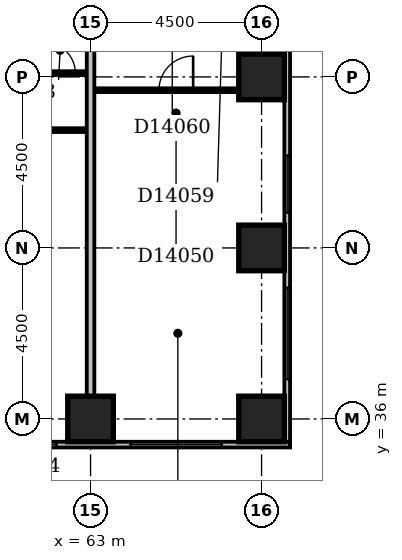
"""IFC4 building model, lengths in metres.
Left out: names, types, materials, properties, quantities, classifications, styles, units other than length and angle.
Written with IfcOpenShell. Run it as: python <this file> out.ifc"""

import sys

from ifc_helpers import new_model, si_unit, direction, frame, frame_2d, origin, origin_2d, place, context, subcontext, project, spatial, rectangle, extrude, element, fill, save


model = new_model("IFC4")
c1 = context("Model", 3, precision=1e-05, world=origin(), true_north=direction((0.0, 1.0)))
c2 = subcontext(c1, "Body", "Model", "MODEL_VIEW")
j1 = project(units=[si_unit("LENGTHUNIT", "METRE"), si_unit("PLANEANGLEUNIT", "RADIAN")], contexts=[c1])
p1 = place(None, origin())
s1 = spatial("IfcSite", under=j1, at=p1, CompositionType="ELEMENT")
p2 = place(p1, origin())
s2 = spatial("IfcBuilding", under=s1, at=p2, CompositionType="ELEMENT")
p3 = place(p2, frame((0.0, 0.0, 61.4)))
s3 = spatial("IfcBuildingStorey", under=s2, at=p3, CompositionType="ELEMENT", Elevation=61.4)
for number, where, z_axis, x_axis in (
    (1, (63.0, 36.0, -0.3), (0.0, 0.0, 1.0), (1.0, 0.0, 0.0)),
    (2, (67.5, 36.0, -0.3), (0.0, 0.0, 1.0), (1.0, 0.0, 0.0)),
    (3, (67.5, 40.5, -0.3), (0.0, 0.0, 1.0), (1.0, 0.0, 0.0)),
    (4, (67.5, 45.0, -0.3), (0.0, 0.0, 1.0), (1.0, 0.0, 0.0)),
):
    element("IfcColumn", number, at=place(p3, frame(where, z_axis=z_axis, x_axis=x_axis)), inside=s3, PredefinedType="COLUMN", context=c2, shape_type="SweptSolid", body=[
        extrude(rectangle(XDim=1.2, YDim=1.2, at=origin_2d()), origin(), (0.0, 0.0, 1.0), 3.6),
    ])
p4 = place(p3, frame((23.1, 35.325, 0.0), z_axis=(0.0, 0.0, 1.0), x_axis=(1.0, 0.0, 0.0)))
e5 = element("IfcWall", 5, at=p4, inside=s3, PredefinedType="STANDARD", context=c2, shape_type="SweptSolid", body=[
    extrude(rectangle(XDim=45.15, YDim=0.15, at=frame_2d((22.575, 0.0))), origin(), (0.0, 0.0, 1.0), 2.7),
])
p5 = place(p4, frame((0.45, 0.0, 0.6)))
e6 = element("IfcOpeningElement", 6, at=p5, cuts=e5, PredefinedType="OPENING", context=c2, shape_type="SweptSolid", body=[
    extrude(rectangle(XDim=2.4, YDim=1.8, at=frame_2d((1.2, 0.9))), frame((0.0, 0.087, 0.0), z_axis=(0.0, -1.0, 0.0), x_axis=(1.0, 0.0, 0.0)), (0.0, 0.0, 1.0), 0.174),
])
p6 = place(p4, frame((4.77, 0.0, 0.6)))
e7 = element("IfcOpeningElement", 7, at=p6, cuts=e5, PredefinedType="OPENING", context=c2, shape_type="SweptSolid", body=[
    extrude(rectangle(XDim=2.1, YDim=1.8, at=frame_2d((1.05, 0.9))), frame((0.0, 0.087, 0.0), z_axis=(0.0, -1.0, 0.0), x_axis=(1.0, 0.0, 0.0)), (0.0, 0.0, 1.0), 0.174),
])
p7 = place(p4, frame((9.45, 0.0, 0.6)))
e8 = element("IfcOpeningElement", 8, at=p7, cuts=e5, PredefinedType="OPENING", context=c2, shape_type="SweptSolid", body=[
    extrude(rectangle(XDim=2.4, YDim=1.8, at=frame_2d((1.2, 0.9))), frame((0.0, 0.087, 0.0), z_axis=(0.0, -1.0, 0.0), x_axis=(1.0, 0.0, 0.0)), (0.0, 0.0, 1.0), 0.174),
])
p8 = place(p4, frame((13.95, 0.0, 0.6)))
e9 = element("IfcOpeningElement", 9, at=p8, cuts=e5, PredefinedType="OPENING", context=c2, shape_type="SweptSolid", body=[
    extrude(rectangle(XDim=2.4, YDim=1.8, at=frame_2d((1.2, 0.9))), frame((0.0, 0.087, 0.0), z_axis=(0.0, -1.0, 0.0), x_axis=(1.0, 0.0, 0.0)), (0.0, 0.0, 1.0), 0.174),
])
p9 = place(p4, frame((19.47, 0.0, 0.6)))
e10 = element("IfcOpeningElement", 10, at=p9, cuts=e5, PredefinedType="OPENING", context=c2, shape_type="SweptSolid", body=[
    extrude(rectangle(XDim=1.5, YDim=1.8, at=frame_2d((0.75, 0.9))), frame((0.0, 0.087, 0.0), z_axis=(0.0, -1.0, 0.0), x_axis=(1.0, 0.0, 0.0)), (0.0, 0.0, 1.0), 0.174),
])
p10 = place(p4, frame((22.95, 0.0, 0.6)))
e11 = element("IfcOpeningElement", 11, at=p10, cuts=e5, PredefinedType="OPENING", context=c2, shape_type="SweptSolid", body=[
    extrude(rectangle(XDim=2.4, YDim=1.8, at=frame_2d((1.2, 0.9))), frame((0.0, 0.087, 0.0), z_axis=(0.0, -1.0, 0.0), x_axis=(1.0, 0.0, 0.0)), (0.0, 0.0, 1.0), 0.174),
])
p11 = place(p4, frame((27.45, 0.0, 0.6)))
e12 = element("IfcOpeningElement", 12, at=p11, cuts=e5, PredefinedType="OPENING", context=c2, shape_type="SweptSolid", body=[
    extrude(rectangle(XDim=2.4, YDim=1.8, at=frame_2d((1.2, 0.9))), frame((0.0, 0.087, 0.0), z_axis=(0.0, -1.0, 0.0), x_axis=(1.0, 0.0, 0.0)), (0.0, 0.0, 1.0), 0.174),
])
p12 = place(p4, frame((31.95, 0.0, 0.6)))
e13 = element("IfcOpeningElement", 13, at=p12, cuts=e5, PredefinedType="OPENING", context=c2, shape_type="SweptSolid", body=[
    extrude(rectangle(XDim=2.4, YDim=1.8, at=frame_2d((1.2, 0.9))), frame((0.0, 0.087, 0.0), z_axis=(0.0, -1.0, 0.0), x_axis=(1.0, 0.0, 0.0)), (0.0, 0.0, 1.0), 0.174),
])
p13 = place(p4, frame((38.403, 0.0, 0.6)))
e14 = element("IfcOpeningElement", 14, at=p13, cuts=e5, PredefinedType="OPENING", context=c2, shape_type="SweptSolid", body=[
    extrude(rectangle(XDim=0.6, YDim=1.8, at=frame_2d((0.3, 0.9))), frame((0.0, 0.087, 0.0), z_axis=(0.0, -1.0, 0.0), x_axis=(1.0, 0.0, 0.0)), (0.0, 0.0, 1.0), 0.174),
])
p14 = place(p4, frame((40.95, 0.0, 0.6)))
e15 = element("IfcOpeningElement", 15, at=p14, cuts=e5, PredefinedType="OPENING", context=c2, shape_type="SweptSolid", body=[
    extrude(rectangle(XDim=2.4, YDim=1.8, at=frame_2d((1.2, 0.9))), frame((0.0, 0.087, 0.0), z_axis=(0.0, -1.0, 0.0), x_axis=(1.0, 0.0, 0.0)), (0.0, 0.0, 1.0), 0.174),
])
p15 = place(p3, frame((68.175, 35.4, 0.0), z_axis=(0.0, 0.0, 1.0), x_axis=(0.0, 1.0, 0.0)))
e16 = element("IfcWall", 16, at=p15, inside=s3, PredefinedType="STANDARD", context=c2, shape_type="SweptSolid", body=[
    extrude(rectangle(XDim=23.85, YDim=0.15, at=frame_2d((11.925, 0.0))), origin(), (0.0, 0.0, 1.0), 2.7),
])
p16 = place(p15, frame((1.65, 0.0, 0.6)))
e17 = element("IfcOpeningElement", 17, at=p16, cuts=e16, PredefinedType="OPENING", context=c2, shape_type="SweptSolid", body=[
    extrude(rectangle(XDim=2.4, YDim=1.8, at=frame_2d((1.2, 0.9))), frame((0.0, 0.087, 0.0), z_axis=(0.0, -1.0, 0.0), x_axis=(1.0, 0.0, 0.0)), (0.0, 0.0, 1.0), 0.174),
])
p17 = place(p15, frame((6.03, 0.0, 0.6)))
e18 = element("IfcOpeningElement", 18, at=p17, cuts=e16, PredefinedType="OPENING", context=c2, shape_type="SweptSolid", body=[
    extrude(rectangle(XDim=1.5, YDim=1.8, at=frame_2d((0.75, 0.9))), frame((0.0, 0.087, 0.0), z_axis=(0.0, -1.0, 0.0), x_axis=(1.0, 0.0, 0.0)), (0.0, 0.0, 1.0), 0.174),
])
p18 = place(p3, frame((63.0, 36.6, 0.0), z_axis=(0.0, 0.0, 1.0), x_axis=(0.0, 1.0, 0.0)))
e19 = element("IfcWall", 19, at=p18, inside=s3, PredefinedType="PARTITIONING", context=c2, shape_type="SweptSolid", body=[
    extrude(rectangle(XDim=12.8, YDim=0.2, at=frame_2d((6.4, 0.0))), origin(), (0.0, 0.0, 1.0), 2.4),
])
p19 = place(p3, frame((54.1, 43.6, 0.0), z_axis=(0.0, 0.0, 1.0), x_axis=(1.0, 0.0, 0.0)))
e20 = element("IfcWall", 20, at=p19, inside=s3, PredefinedType="PARTITIONING", context=c2, shape_type="SweptSolid", body=[
    extrude(rectangle(XDim=8.8, YDim=0.1, at=frame_2d((4.4, 0.0))), origin(), (0.0, 0.0, 1.0), 3.3),
])
p20 = place(p19, frame((1.7, 0.0, 0.0)))
e21 = element("IfcOpeningElement", 21, at=p20, cuts=e20, PredefinedType="OPENING", context=c2, shape_type="SweptSolid", body=[
    extrude(rectangle(XDim=0.9, YDim=2.1, at=frame_2d((0.45, 1.05))), frame((0.0, 0.062, 0.0), z_axis=(0.0, -1.0, 0.0), x_axis=(1.0, 0.0, 0.0)), (0.0, 0.0, 1.0), 0.124),
])
p21 = place(p19, frame((6.2, 0.0, 0.0)))
e22 = element("IfcOpeningElement", 22, at=p21, cuts=e20, PredefinedType="OPENING", context=c2, shape_type="SweptSolid", body=[
    extrude(rectangle(XDim=0.9, YDim=2.1, at=frame_2d((0.45, 1.05))), frame((0.0, 0.062, 0.0), z_axis=(0.0, -1.0, 0.0), x_axis=(1.0, 0.0, 0.0)), (0.0, 0.0, 1.0), 0.124),
])
p22 = place(p3, frame((63.1, 44.65, 0.0), z_axis=(0.0, 0.0, 1.0), x_axis=(1.0, 0.0, 0.0)))
e23 = element("IfcWall", 23, at=p22, inside=s3, PredefinedType="PARTITIONING", context=c2, shape_type="SweptSolid", body=[
    extrude(rectangle(XDim=3.8, YDim=0.1, at=frame_2d((1.9, 0.0))), origin(), (0.0, 0.0, 1.0), 3.3),
])
p23 = place(p22, frame((1.7, 0.0, 0.0)))
e24 = element("IfcOpeningElement", 24, at=p23, cuts=e23, PredefinedType="OPENING", context=c2, shape_type="SweptSolid", body=[
    extrude(rectangle(XDim=0.9, YDim=2.1, at=frame_2d((0.45, 1.05))), frame((0.0, 0.062, 0.0), z_axis=(0.0, -1.0, 0.0), x_axis=(1.0, 0.0, 0.0)), (0.0, 0.0, 1.0), 0.124),
])
p24 = place(p3, frame((55.65, 45.1, 0.0), z_axis=(0.0, 0.0, 1.0), x_axis=(1.0, 0.0, 0.0)))
e25 = element("IfcWall", 25, at=p24, inside=s3, PredefinedType="PARTITIONING", context=c2, shape_type="SweptSolid", body=[
    extrude(rectangle(XDim=7.25, YDim=0.1, at=frame_2d((3.625, 0.0))), origin(), (0.0, 0.0, 1.0), 3.3),
])
p25 = place(p24, frame((4.15, 0.0, 0.0)))
e26 = element("IfcOpeningElement", 26, at=p25, cuts=e25, PredefinedType="OPENING", context=c2, shape_type="SweptSolid", body=[
    extrude(rectangle(XDim=0.8, YDim=2.1, at=frame_2d((0.4, 1.05))), frame((0.0, 0.062, 0.0), z_axis=(0.0, -1.0, 0.0), x_axis=(1.0, 0.0, 0.0)), (0.0, 0.0, 1.0), 0.124),
])
p26 = place(p24, frame((1.2, 0.0, 0.0)))
e27 = element("IfcOpeningElement", 27, at=p26, cuts=e25, PredefinedType="OPENING", context=c2, shape_type="SweptSolid", body=[
    extrude(rectangle(XDim=0.9, YDim=2.1, at=frame_2d((0.45, 1.05))), frame((0.0, 0.062, 0.0), z_axis=(0.0, -1.0, 0.0), x_axis=(1.0, 0.0, 0.0)), (0.0, 0.0, 1.0), 0.124),
])
p27 = place(p24, frame((6.15, 0.0, 0.0)))
e28 = element("IfcOpeningElement", 28, at=p27, cuts=e25, PredefinedType="OPENING", context=c2, shape_type="SweptSolid", body=[
    extrude(rectangle(XDim=0.8, YDim=2.1, at=frame_2d((0.4, 1.05))), frame((0.0, 0.062, 0.0), z_axis=(0.0, -1.0, 0.0), x_axis=(1.0, 0.0, 0.0)), (0.0, 0.0, 1.0), 0.124),
])
p28 = place(p13, origin())
e29 = element("IfcWindow", 29, at=p28, inside=s3, PartitioningType="SINGLE_PANEL", PredefinedType="WINDOW", context=c2, shape_type="SweptSolid", body=[
    extrude(rectangle(XDim=0.6, YDim=1.8, at=frame_2d((0.3, 0.9))), frame((0.0, 0.03, 0.0), z_axis=(0.0, -1.0, 0.0), x_axis=(1.0, 0.0, 0.0)), (0.0, 0.0, 1.0), 0.06),
])
fill(e14, e29)
p29 = place(p14, origin())
e30 = element("IfcWindow", 30, at=p29, inside=s3, PartitioningType="SINGLE_PANEL", PredefinedType="WINDOW", context=c2, shape_type="SweptSolid", body=[
    extrude(rectangle(XDim=2.4, YDim=1.8, at=frame_2d((1.2, 0.9))), frame((0.0, 0.03, 0.0), z_axis=(0.0, -1.0, 0.0), x_axis=(1.0, 0.0, 0.0)), (0.0, 0.0, 1.0), 0.06),
])
fill(e15, e30)
p30 = place(p16, origin())
e31 = element("IfcWindow", 31, at=p30, inside=s3, PartitioningType="SINGLE_PANEL", PredefinedType="WINDOW", context=c2, shape_type="SweptSolid", body=[
    extrude(rectangle(XDim=2.4, YDim=1.8, at=frame_2d((1.2, 0.9))), frame((0.0, 0.03, 0.0), z_axis=(0.0, -1.0, 0.0), x_axis=(1.0, 0.0, 0.0)), (0.0, 0.0, 1.0), 0.06),
])
fill(e17, e31)
p31 = place(p17, origin())
e32 = element("IfcWindow", 32, at=p31, inside=s3, PartitioningType="SINGLE_PANEL", PredefinedType="WINDOW", context=c2, shape_type="SweptSolid", body=[
    extrude(rectangle(XDim=1.5, YDim=1.8, at=frame_2d((0.75, 0.9))), frame((0.0, 0.03, 0.0), z_axis=(0.0, -1.0, 0.0), x_axis=(1.0, 0.0, 0.0)), (0.0, 0.0, 1.0), 0.06),
])
fill(e18, e32)
p32 = place(p23, frame((0.9, 0.0, 0.0), z_axis=(0.0, 0.0, 1.0), x_axis=(-1.0, 0.0, 0.0)))
e33 = element("IfcDoor", 33, at=p32, inside=s3, OperationType="SINGLE_SWING_LEFT", PredefinedType="DOOR", context=c2, shape_type="SweptSolid", body=[
    extrude(rectangle(XDim=0.9, YDim=2.1, at=frame_2d((0.45, 1.05))), frame((0.0, 0.025, 0.0), z_axis=(0.0, -1.0, 0.0), x_axis=(1.0, 0.0, 0.0)), (0.0, 0.0, 1.0), 0.05),
])
fill(e24, e33)
p33 = place(p27, origin())
e34 = element("IfcDoor", 34, at=p33, inside=s3, OperationType="SINGLE_SWING_LEFT", PredefinedType="DOOR", context=c2, shape_type="SweptSolid", body=[
    extrude(rectangle(XDim=0.8, YDim=2.1, at=frame_2d((0.4, 1.05))), frame((0.0, 0.025, 0.0), z_axis=(0.0, -1.0, 0.0), x_axis=(1.0, 0.0, 0.0)), (0.0, 0.0, 1.0), 0.05),
])
fill(e28, e34)
save(model, sys.argv[1])
